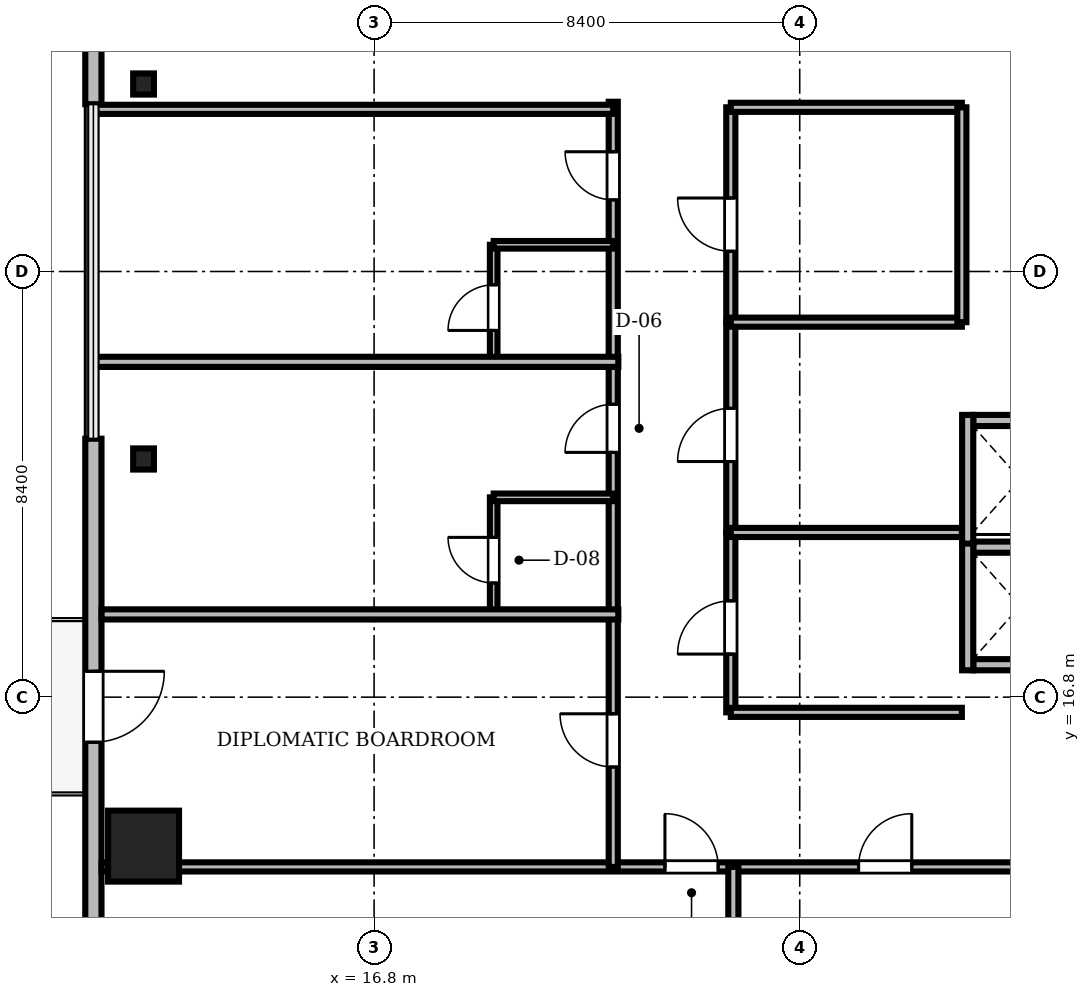
"""IFC4 building model, lengths in metres.
Left out: names, types, materials, properties, quantities, classifications, styles, units other than length and angle.
Written with IfcOpenShell. Run it as: python <this file> out.ifc"""

import sys

from ifc_helpers import new_model, si_unit, direction, frame, frame_2d, origin, origin_2d, place, context, subcontext, project, spatial, rectangle, i_section, extrude, source, transform, mapped, element, fill, save


model = new_model("IFC4")
c1 = context("Model", 3, precision=1e-05, world=origin(), true_north=direction((0.0, 1.0)))
c2 = subcontext(c1, "Body", "Model", "MODEL_VIEW")
j1 = project(units=[si_unit("LENGTHUNIT", "METRE"), si_unit("PLANEANGLEUNIT", "RADIAN")], contexts=[c1])
p1 = place(None, origin())
s1 = spatial("IfcSite", under=j1, at=p1, CompositionType="ELEMENT")
p2 = place(p1, origin())
s2 = spatial("IfcBuilding", under=s1, at=p2, CompositionType="ELEMENT")
p3 = place(p2, frame((0.0, 0.0, 207.3)))
s3 = spatial("IfcBuildingStorey", under=s2, at=p3, CompositionType="ELEMENT", Elevation=207.3)
m1 = source(origin(), c2, "Body", "SweptSolid", [
    extrude(rectangle(XDim=1.4, YDim=1.4, at=origin_2d()), origin(), (0.0, 0.0, 1.0), 3.53),
])
p4 = place(p3, frame((12.25, 13.86, 0.0), z_axis=(0.0, 0.0, 1.0), x_axis=(1.0, 0.0, 0.0)))
e1 = element("IfcColumn", 1, at=p4, inside=s3, PredefinedType="COLUMN", context=c2, shape_type="MappedRepresentation", body=[
    mapped(m1, transform((0.0, 0.0, 0.0), scale=1.0)),
])
m2 = source(origin(), c2, "Body", "SweptSolid", [
    extrude(i_section(OverallWidth=0.409, OverallDepth=0.417, WebThickness=0.021, FlangeThickness=0.033, FilletRadius=0.015, at=origin_2d()), origin(), (0.0, 0.0, 1.0), 3.53),
])
for number, where, z_axis, x_axis in (
    (2, (12.25, 28.9, 0.0), (0.0, 0.0, 1.0), (1.0, 0.0, 0.0)),
    (3, (12.25, 21.5, 0.0), (0.0, 0.0, 1.0), (1.0, 0.0, 0.0)),
):
    element("IfcColumn", number, at=place(p3, frame(where, z_axis=z_axis, x_axis=x_axis)), inside=s3, PredefinedType="COLUMN", context=c2, shape_type="MappedRepresentation", body=[
        mapped(m2, transform((0.0, 0.0, 0.0), scale=1.0)),
    ])
m3 = source(origin(), c2, "Body", "SweptSolid", [
    extrude(rectangle(XDim=15.6, YDim=0.32, at=frame_2d((7.8, 0.0))), origin(), (0.0, 0.0, 1.0), 3.53),
])
p5 = place(p3, frame((11.26, 44.1, 0.0), z_axis=(0.0, 0.0, 1.0), x_axis=(0.0, -1.0, 0.0)))
e4 = element("IfcWall", 4, at=p5, inside=s3, PredefinedType="SOLIDWALL", context=c2, shape_type="MappedRepresentation", body=[
    mapped(m3, transform((0.0, 0.0, 0.0), scale=1.0)),
])
m4 = source(origin(), c2, "Body", "SweptSolid", [
    extrude(rectangle(XDim=2.2, YDim=2.4, at=frame_2d((1.1, 1.2))), frame((0.0, 0.17, 0.0), z_axis=(0.0, -1.0, 0.0), x_axis=(1.0, 0.0, 0.0)), (0.0, 0.0, 1.0), 0.34),
])
p6 = place(p5, frame((3.005, 0.0, 0.72)))
e5 = element("IfcOpeningElement", 5, at=p6, cuts=e4, PredefinedType="OPENING", context=c2, shape_type="MappedRepresentation", body=[
    mapped(m4, transform((0.0, 0.0, 0.0), scale=1.0)),
])
m5 = source(origin(), c2, "Body", "SweptSolid", [
    extrude(rectangle(XDim=15.6, YDim=0.32, at=frame_2d((7.8, 0.0))), origin(), (0.0, 0.0, 1.0), 3.53),
])
p7 = place(p3, frame((11.26, 21.9, 0.0), z_axis=(0.0, 0.0, 1.0), x_axis=(0.0, -1.0, 0.0)))
e6 = element("IfcWall", 6, at=p7, inside=s3, PredefinedType="SOLIDWALL", context=c2, shape_type="MappedRepresentation", body=[
    mapped(m5, transform((0.0, 0.0, 0.0), scale=1.0)),
])
m6 = source(origin(), c2, "Body", "SweptSolid", [
    extrude(rectangle(XDim=1.4, YDim=2.3, at=frame_2d((0.7, 1.15))), frame((0.0, 0.17, 0.0), z_axis=(0.0, -1.0, 0.0), x_axis=(1.0, 0.0, 0.0)), (0.0, 0.0, 1.0), 0.34),
])
p8 = place(p7, frame((4.59, 0.0, 0.0)))
e7 = element("IfcOpeningElement", 7, at=p8, cuts=e6, PredefinedType="OPENING", context=c2, shape_type="MappedRepresentation", body=[
    mapped(m6, transform((0.0, 0.0, 0.0), scale=1.0)),
])
p9 = place(p7, frame((10.395, 0.0, 0.72)))
e8 = element("IfcOpeningElement", 8, at=p9, cuts=e6, PredefinedType="OPENING", context=c2, shape_type="MappedRepresentation", body=[
    mapped(m4, transform((0.0, 0.0, 0.0), scale=1.0)),
])
m7 = source(origin(), c2, "Body", "SweptSolid", [
    extrude(rectangle(XDim=1.85, YDim=0.22, at=frame_2d((0.925, 0.0))), origin(), (0.0, 0.0, 1.0), 2.972),
])
p10 = place(p3, frame((28.625, 17.44, 0.0), z_axis=(0.0, 0.0, 1.0), x_axis=(1.0, 0.0, 0.0)))
e9 = element("IfcWall", 9, at=p10, inside=s3, PredefinedType="SOLIDWALL", context=c2, shape_type="MappedRepresentation", body=[
    mapped(m7, transform((0.0, 0.0, 0.0), scale=1.0)),
])
m8 = source(origin(), c2, "Body", "SweptSolid", [
    extrude(rectangle(XDim=1.85, YDim=0.22, at=frame_2d((0.925, 0.0))), origin(), (0.0, 0.0, 1.0), 3.53),
])
p11 = place(p3, frame((28.625, 19.76, 0.0), z_axis=(0.0, 0.0, 1.0), x_axis=(1.0, 0.0, 0.0)))
e10 = element("IfcWall", 10, at=p11, inside=s3, PredefinedType="SOLIDWALL", context=c2, shape_type="MappedRepresentation", body=[
    mapped(m8, transform((0.0, 0.0, 0.0), scale=1.0)),
])
m9 = source(origin(), c2, "Body", "SweptSolid", [
    extrude(rectangle(XDim=2.54, YDim=0.22, at=frame_2d((1.27, 0.0))), origin(), (0.0, 0.0, 1.0), 2.972),
])
p12 = place(p3, frame((28.515, 17.33, 0.0), z_axis=(0.0, 0.0, 1.0), x_axis=(0.0, 1.0, 0.0)))
e11 = element("IfcWall", 11, at=p12, inside=s3, PredefinedType="SOLIDWALL", context=c2, shape_type="MappedRepresentation", body=[
    mapped(m9, transform((0.0, 0.0, 0.0), scale=1.0)),
])
p13 = place(p3, frame((28.625, 22.26, 0.0), z_axis=(0.0, 0.0, 1.0), x_axis=(1.0, 0.0, 0.0)))
e12 = element("IfcWall", 12, at=p13, inside=s3, PredefinedType="SOLIDWALL", context=c2, shape_type="MappedRepresentation", body=[
    mapped(m8, transform((0.0, 0.0, 0.0), scale=1.0)),
])
m10 = source(origin(), c2, "Body", "SweptSolid", [
    extrude(rectangle(XDim=2.54, YDim=0.22, at=frame_2d((1.27, 0.0))), origin(), (0.0, 0.0, 1.0), 3.53),
])
p14 = place(p3, frame((28.515, 19.83, 0.0), z_axis=(0.0, 0.0, 1.0), x_axis=(0.0, 1.0, 0.0)))
e13 = element("IfcWall", 13, at=p14, inside=s3, PredefinedType="SOLIDWALL", context=c2, shape_type="MappedRepresentation", body=[
    mapped(m10, transform((0.0, 0.0, 0.0), scale=1.0)),
])
m11 = source(origin(), c2, "Body", "SweptSolid", [
    extrude(rectangle(XDim=46.156, YDim=0.18, at=frame_2d((23.078, 0.0))), origin(), (0.0, 0.0, 1.0), 2.772),
])
p15 = place(p3, frame((11.422, 13.45, 0.0), z_axis=(0.0, 0.0, 1.0), x_axis=(1.0, 0.0, 0.0)))
e14 = element("IfcWall", 14, at=p15, inside=s3, PredefinedType="PARTITIONING", context=c2, shape_type="MappedRepresentation", body=[
    mapped(m11, transform((0.0, 0.0, 0.0), scale=1.0)),
])
m12 = source(origin(), c2, "Body", "SweptSolid", [
    extrude(rectangle(XDim=1.05, YDim=2.2, at=frame_2d((0.525, 1.1))), frame((0.0, 0.1, 0.0), z_axis=(0.0, -1.0, 0.0), x_axis=(1.0, 0.0, 0.0)), (0.0, 0.0, 1.0), 0.2),
])
p16 = place(p15, frame((11.118, 0.0, 0.0)))
e15 = element("IfcOpeningElement", 15, at=p16, cuts=e14, PredefinedType="OPENING", context=c2, shape_type="MappedRepresentation", body=[
    mapped(m12, transform((0.0, 0.0, 0.0), scale=1.0)),
])
p17 = place(p15, frame((14.939, 0.0, 0.0)))
e16 = element("IfcOpeningElement", 16, at=p17, cuts=e14, PredefinedType="OPENING", context=c2, shape_type="MappedRepresentation", body=[
    mapped(m12, transform((0.0, 0.0, 0.0), scale=1.0)),
])
p18 = place(p15, frame((20.922, 0.0, 0.0)))
e17 = element("IfcOpeningElement", 17, at=p18, cuts=e14, PredefinedType="OPENING", context=c2, shape_type="MappedRepresentation", body=[
    mapped(m12, transform((0.0, 0.0, 0.0), scale=1.0)),
])
p19 = place(p15, frame((26.904, 0.0, 0.0)))
e18 = element("IfcOpeningElement", 18, at=p19, cuts=e14, PredefinedType="OPENING", context=c2, shape_type="MappedRepresentation", body=[
    mapped(m12, transform((0.0, 0.0, 0.0), scale=1.0)),
])
p20 = place(p15, frame((32.887, 0.0, 0.0)))
e19 = element("IfcOpeningElement", 19, at=p20, cuts=e14, PredefinedType="OPENING", context=c2, shape_type="MappedRepresentation", body=[
    mapped(m12, transform((0.0, 0.0, 0.0), scale=1.0)),
])
p21 = place(p15, frame((37.498, 0.0, 0.0)))
e20 = element("IfcOpeningElement", 20, at=p21, cuts=e14, PredefinedType="OPENING", context=c2, shape_type="MappedRepresentation", body=[
    mapped(m12, transform((0.0, 0.0, 0.0), scale=1.0)),
])
m13 = source(origin(), c2, "Body", "SweptSolid", [
    extrude(rectangle(XDim=15.1, YDim=0.18, at=frame_2d((7.55, 0.0))), origin(), (0.0, 0.0, 1.0), 2.972),
])
p22 = place(p3, frame((21.52, 13.45, 0.0), z_axis=(0.0, 0.0, 1.0), x_axis=(0.0, 1.0, 0.0)))
e21 = element("IfcWall", 21, at=p22, inside=s3, PredefinedType="PARTITIONING", context=c2, shape_type="MappedRepresentation", body=[
    mapped(m13, transform((0.0, 0.0, 0.0), scale=1.0)),
])
p23 = place(p22, frame((1.972, 0.0, 0.0)))
e22 = element("IfcOpeningElement", 22, at=p23, cuts=e21, PredefinedType="OPENING", context=c2, shape_type="MappedRepresentation", body=[
    mapped(m12, transform((0.0, 0.0, 0.0), scale=1.0)),
])
m14 = source(origin(), c2, "Body", "SweptSolid", [
    extrude(rectangle(XDim=0.95, YDim=2.15, at=frame_2d((0.475, 1.075))), frame((0.0, 0.1, 0.0), z_axis=(0.0, -1.0, 0.0), x_axis=(1.0, 0.0, 0.0)), (0.0, 0.0, 1.0), 0.2),
])
p24 = place(p22, frame((8.18, 0.0, 0.0)))
e23 = element("IfcOpeningElement", 23, at=p24, cuts=e21, PredefinedType="OPENING", context=c2, shape_type="MappedRepresentation", body=[
    mapped(m14, transform((0.0, 0.0, 0.0), scale=1.0)),
])
p25 = place(p22, frame((13.163, 0.0, 0.0)))
e24 = element("IfcOpeningElement", 24, at=p25, cuts=e21, PredefinedType="OPENING", context=c2, shape_type="MappedRepresentation", body=[
    mapped(m14, transform((0.0, 0.0, 0.0), scale=1.0)),
])
m15 = source(origin(), c2, "Body", "SweptSolid", [
    extrude(rectangle(XDim=4.24, YDim=0.18, at=frame_2d((2.12, 0.0))), origin(), (0.0, 0.0, 1.0), 2.972),
])
p26 = place(p3, frame((23.84, 24.2, 0.0), z_axis=(0.0, 0.0, 1.0), x_axis=(0.0, 1.0, 0.0)))
e25 = element("IfcWall", 25, at=p26, inside=s3, PredefinedType="PARTITIONING", context=c2, shape_type="MappedRepresentation", body=[
    mapped(m15, transform((0.0, 0.0, 0.0), scale=1.0)),
])
p27 = place(p26, frame((1.4, 0.0, 0.0)))
e26 = element("IfcOpeningElement", 26, at=p27, cuts=e25, PredefinedType="OPENING", context=c2, shape_type="MappedRepresentation", body=[
    mapped(m12, transform((0.0, 0.0, 0.0), scale=1.0)),
])
m16 = source(origin(), c2, "Body", "SweptSolid", [
    extrude(rectangle(XDim=4.15, YDim=0.18, at=frame_2d((2.075, 0.0))), origin(), (0.0, 0.0, 1.0), 3.192),
])
p28 = place(p3, frame((23.84, 20.05, 0.0), z_axis=(0.0, 0.0, 1.0), x_axis=(0.0, 1.0, 0.0)))
e27 = element("IfcWall", 27, at=p28, inside=s3, PredefinedType="PARTITIONING", context=c2, shape_type="MappedRepresentation", body=[
    mapped(m16, transform((0.0, 0.0, 0.0), scale=1.0)),
])
p29 = place(p28, frame((1.4, 0.0, 0.0)))
e28 = element("IfcOpeningElement", 28, at=p29, cuts=e27, PredefinedType="OPENING", context=c2, shape_type="MappedRepresentation", body=[
    mapped(m12, transform((0.0, 0.0, 0.0), scale=1.0)),
])
m17 = source(origin(), c2, "Body", "SweptSolid", [
    extrude(rectangle(XDim=3.55, YDim=0.18, at=frame_2d((1.775, 0.0))), origin(), (0.0, 0.0, 1.0), 2.972),
])
p30 = place(p3, frame((23.84, 16.5, 0.0), z_axis=(0.0, 0.0, 1.0), x_axis=(0.0, 1.0, 0.0)))
e29 = element("IfcWall", 29, at=p30, inside=s3, PredefinedType="PARTITIONING", context=c2, shape_type="MappedRepresentation", body=[
    mapped(m17, transform((0.0, 0.0, 0.0), scale=1.0)),
])
p31 = place(p30, frame((1.15, 0.0, 0.0)))
e30 = element("IfcOpeningElement", 30, at=p31, cuts=e29, PredefinedType="OPENING", context=c2, shape_type="MappedRepresentation", body=[
    mapped(m12, transform((0.0, 0.0, 0.0), scale=1.0)),
])
m18 = source(origin(), c2, "Body", "SweptSolid", [
    extrude(rectangle(XDim=2.29, YDim=0.15, at=frame_2d((1.145, 0.0))), origin(), (0.0, 0.0, 1.0), 2.972),
])
p32 = place(p3, frame((19.16, 18.453, 0.0), z_axis=(0.0, 0.0, 1.0), x_axis=(0.0, 1.0, 0.0)))
e31 = element("IfcWall", 31, at=p32, inside=s3, PredefinedType="PARTITIONING", context=c2, shape_type="MappedRepresentation", body=[
    mapped(m18, transform((0.0, 0.0, 0.0), scale=1.0)),
])
m19 = source(origin(), c2, "Body", "SweptSolid", [
    extrude(rectangle(XDim=0.9, YDim=2.1, at=frame_2d((0.45, 1.05))), frame((0.0, 0.085, 0.0), z_axis=(0.0, -1.0, 0.0), x_axis=(1.0, 0.0, 0.0)), (0.0, 0.0, 1.0), 0.17),
])
p33 = place(p32, frame((0.6, 0.0, 0.0)))
e32 = element("IfcOpeningElement", 32, at=p33, cuts=e31, PredefinedType="OPENING", context=c2, shape_type="MappedRepresentation", body=[
    mapped(m19, transform((0.0, 0.0, 0.0), scale=1.0)),
])
m20 = source(origin(), c2, "Body", "SweptSolid", [
    extrude(rectangle(XDim=2.29, YDim=0.15, at=frame_2d((1.145, 0.0))), origin(), (0.0, 0.0, 1.0), 3.192),
])
p34 = place(p3, frame((19.16, 23.437, 0.0), z_axis=(0.0, 0.0, 1.0), x_axis=(0.0, 1.0, 0.0)))
e33 = element("IfcWall", 33, at=p34, inside=s3, PredefinedType="PARTITIONING", context=c2, shape_type="MappedRepresentation", body=[
    mapped(m20, transform((0.0, 0.0, 0.0), scale=1.0)),
])
p35 = place(p34, frame((0.6, 0.0, 0.0)))
e34 = element("IfcOpeningElement", 34, at=p35, cuts=e33, PredefinedType="OPENING", context=c2, shape_type="MappedRepresentation", body=[
    mapped(m19, transform((0.0, 0.0, 0.0), scale=1.0)),
])
m21 = source(origin(), c2, "Body", "SweptSolid", [
    extrude(rectangle(XDim=11.328, YDim=0.2, at=frame_2d((5.664, 0.0))), origin(), (0.0, 0.0, 1.0), 2.772),
])
p36 = place(p3, frame((23.89, 2.122, 0.0), z_axis=(0.0, 0.0, 1.0), x_axis=(0.0, 1.0, 0.0)))
e35 = element("IfcWall", 35, at=p36, inside=s3, PredefinedType="PARTITIONING", context=c2, shape_type="MappedRepresentation", body=[
    mapped(m21, transform((0.0, 0.0, 0.0), scale=1.0)),
])
m22 = source(origin(), c2, "Body", "SweptSolid", [
    extrude(rectangle(XDim=10.198, YDim=0.2, at=frame_2d((5.099, 0.0))), origin(), (0.0, 0.0, 1.0), 2.772),
])
p37 = place(p3, frame((11.422, 18.433, 0.0), z_axis=(0.0, 0.0, 1.0), x_axis=(1.0, 0.0, 0.0)))
e36 = element("IfcWall", 36, at=p37, inside=s3, PredefinedType="PARTITIONING", context=c2, shape_type="MappedRepresentation", body=[
    mapped(m22, transform((0.0, 0.0, 0.0), scale=1.0)),
])
m23 = source(origin(), c2, "Body", "SweptSolid", [
    extrude(rectangle(XDim=10.39, YDim=0.2, at=frame_2d((5.195, 0.0))), origin(), (0.0, 0.0, 1.0), 2.772),
])
p38 = place(p3, frame((11.23, 23.417, 0.0), z_axis=(0.0, 0.0, 1.0), x_axis=(1.0, 0.0, 0.0)))
e37 = element("IfcWall", 37, at=p38, inside=s3, PredefinedType="PARTITIONING", context=c2, shape_type="MappedRepresentation", body=[
    mapped(m23, transform((0.0, 0.0, 0.0), scale=1.0)),
])
m24 = source(origin(), c2, "Body", "SweptSolid", [
    extrude(rectangle(XDim=10.29, YDim=0.18, at=frame_2d((5.145, 0.0))), origin(), (0.0, 0.0, 1.0), 2.772),
])
p39 = place(p3, frame((11.23, 28.4, 0.0), z_axis=(0.0, 0.0, 1.0), x_axis=(1.0, 0.0, 0.0)))
e38 = element("IfcWall", 38, at=p39, inside=s3, PredefinedType="PARTITIONING", context=c2, shape_type="MappedRepresentation", body=[
    mapped(m24, transform((0.0, 0.0, 0.0), scale=1.0)),
])
m25 = source(origin(), c2, "Body", "SweptSolid", [
    extrude(rectangle(XDim=4.56, YDim=0.18, at=frame_2d((2.28, 0.0))), origin(), (0.0, 0.0, 1.0), 3.53),
])
for number, where, z_axis, x_axis in (
    (39, (23.84, 16.5, 0.0), (0.0, 0.0, 1.0), (1.0, 0.0, 0.0)),
    (40, (23.84, 20.05, 0.0), (0.0, 0.0, 1.0), (1.0, 0.0, 0.0)),
    (41, (23.84, 24.2, 0.0), (0.0, 0.0, 1.0), (1.0, 0.0, 0.0)),
    (42, (23.84, 28.44, 0.0), (0.0, 0.0, 1.0), (1.0, 0.0, 0.0)),
):
    element("IfcWall", number, at=place(p3, frame(where, z_axis=z_axis, x_axis=x_axis)), inside=s3, PredefinedType="PARTITIONING", context=c2, shape_type="MappedRepresentation", body=[
        mapped(m25, transform((0.0, 0.0, 0.0), scale=1.0)),
    ])
p40 = place(p3, frame((28.4, 24.2, 0.0), z_axis=(0.0, 0.0, 1.0), x_axis=(0.0, 1.0, 0.0)))
e43 = element("IfcWall", 43, at=p40, inside=s3, PredefinedType="PARTITIONING", context=c2, shape_type="MappedRepresentation", body=[
    mapped(m15, transform((0.0, 0.0, 0.0), scale=1.0)),
])
m26 = source(origin(), c2, "Body", "SweptSolid", [
    extrude(rectangle(XDim=2.36, YDim=0.15, at=frame_2d((1.18, 0.0))), origin(), (0.0, 0.0, 1.0), 3.53),
])
for number, where, z_axis, x_axis in (
    (44, (19.16, 20.743, 0.0), (0.0, 0.0, 1.0), (1.0, 0.0, 0.0)),
    (45, (19.16, 25.727, 0.0), (0.0, 0.0, 1.0), (1.0, 0.0, 0.0)),
):
    element("IfcWall", number, at=place(p3, frame(where, z_axis=z_axis, x_axis=x_axis)), inside=s3, PredefinedType="PARTITIONING", context=c2, shape_type="MappedRepresentation", body=[
        mapped(m26, transform((0.0, 0.0, 0.0), scale=1.0)),
    ])
m27 = source(origin(), c2, "Body", "SweptSolid", [
    extrude(rectangle(XDim=1.4, YDim=2.3, at=frame_2d((0.7, 1.15))), frame((0.0, 0.025, 0.0), z_axis=(0.0, -1.0, 0.0), x_axis=(1.0, 0.0, 0.0)), (0.0, 0.0, 1.0), 0.05),
])
p41 = place(p8, frame((1.4, 0.0, 0.0), z_axis=(0.0, 0.0, 1.0), x_axis=(-1.0, 0.0, 0.0)))
e46 = element("IfcDoor", 46, at=p41, inside=s3, OperationType="DOUBLE_DOOR_SLIDING", PredefinedType="DOOR", context=c2, shape_type="MappedRepresentation", body=[
    mapped(m27, transform((0.0, 0.0, 0.0), scale=1.0)),
])
fill(e7, e46)
m28 = source(origin(), c2, "Body", "SweptSolid", [
    extrude(rectangle(XDim=1.05, YDim=2.2, at=frame_2d((0.525, 1.1))), frame((0.0, 0.025, 0.0), z_axis=(0.0, -1.0, 0.0), x_axis=(1.0, 0.0, 0.0)), (0.0, 0.0, 1.0), 0.05),
])
p42 = place(p16, origin())
e47 = element("IfcDoor", 47, at=p42, inside=s3, OperationType="SINGLE_SWING_LEFT", PredefinedType="DOOR", context=c2, shape_type="MappedRepresentation", body=[
    mapped(m28, transform((0.0, 0.0, 0.0), scale=1.0)),
])
fill(e15, e47)
p43 = place(p17, origin())
e48 = element("IfcDoor", 48, at=p43, inside=s3, OperationType="SINGLE_SWING_RIGHT", PredefinedType="DOOR", context=c2, shape_type="MappedRepresentation", body=[
    mapped(m28, transform((0.0, 0.0, 0.0), scale=1.0)),
])
fill(e16, e48)
p44 = place(p23, origin())
e49 = element("IfcDoor", 49, at=p44, inside=s3, OperationType="SINGLE_SWING_RIGHT", PredefinedType="DOOR", context=c2, shape_type="MappedRepresentation", body=[
    mapped(m28, transform((0.0, 0.0, 0.0), scale=1.0)),
])
fill(e22, e49)
m29 = source(origin(), c2, "Body", "SweptSolid", [
    extrude(rectangle(XDim=0.95, YDim=2.15, at=frame_2d((0.475, 1.075))), frame((0.0, 0.025, 0.0), z_axis=(0.0, -1.0, 0.0), x_axis=(1.0, 0.0, 0.0)), (0.0, 0.0, 1.0), 0.05),
])
p45 = place(p24, origin())
e50 = element("IfcDoor", 50, at=p45, inside=s3, OperationType="SINGLE_SWING_LEFT", PredefinedType="DOOR", context=c2, shape_type="MappedRepresentation", body=[
    mapped(m29, transform((0.0, 0.0, 0.0), scale=1.0)),
])
fill(e23, e50)
p46 = place(p25, origin())
e51 = element("IfcDoor", 51, at=p46, inside=s3, OperationType="SINGLE_SWING_RIGHT", PredefinedType="DOOR", context=c2, shape_type="MappedRepresentation", body=[
    mapped(m29, transform((0.0, 0.0, 0.0), scale=1.0)),
])
fill(e24, e51)
p47 = place(p27, origin())
e52 = element("IfcDoor", 52, at=p47, inside=s3, OperationType="SINGLE_SWING_RIGHT", PredefinedType="DOOR", context=c2, shape_type="MappedRepresentation", body=[
    mapped(m28, transform((0.0, 0.0, 0.0), scale=1.0)),
])
fill(e26, e52)
p48 = place(p29, origin())
e53 = element("IfcDoor", 53, at=p48, inside=s3, OperationType="SINGLE_SWING_LEFT", PredefinedType="DOOR", context=c2, shape_type="MappedRepresentation", body=[
    mapped(m28, transform((0.0, 0.0, 0.0), scale=1.0)),
])
fill(e28, e53)
p49 = place(p31, origin())
e54 = element("IfcDoor", 54, at=p49, inside=s3, OperationType="SINGLE_SWING_LEFT", PredefinedType="DOOR", context=c2, shape_type="MappedRepresentation", body=[
    mapped(m28, transform((0.0, 0.0, 0.0), scale=1.0)),
])
fill(e30, e54)
m30 = source(origin(), c2, "Body", "SweptSolid", [
    extrude(rectangle(XDim=0.9, YDim=2.1, at=frame_2d((0.45, 1.05))), frame((0.0, 0.025, 0.0), z_axis=(0.0, -1.0, 0.0), x_axis=(1.0, 0.0, 0.0)), (0.0, 0.0, 1.0), 0.05),
])
p50 = place(p33, origin())
e55 = element("IfcDoor", 55, at=p50, inside=s3, OperationType="SINGLE_SWING_RIGHT", PredefinedType="DOOR", context=c2, shape_type="MappedRepresentation", body=[
    mapped(m30, transform((0.0, 0.0, 0.0), scale=1.0)),
])
fill(e32, e55)
p51 = place(p35, origin())
e56 = element("IfcDoor", 56, at=p51, inside=s3, OperationType="SINGLE_SWING_LEFT", PredefinedType="DOOR", context=c2, shape_type="MappedRepresentation", body=[
    mapped(m30, transform((0.0, 0.0, 0.0), scale=1.0)),
])
fill(e34, e56)
save(model, sys.argv[1])
